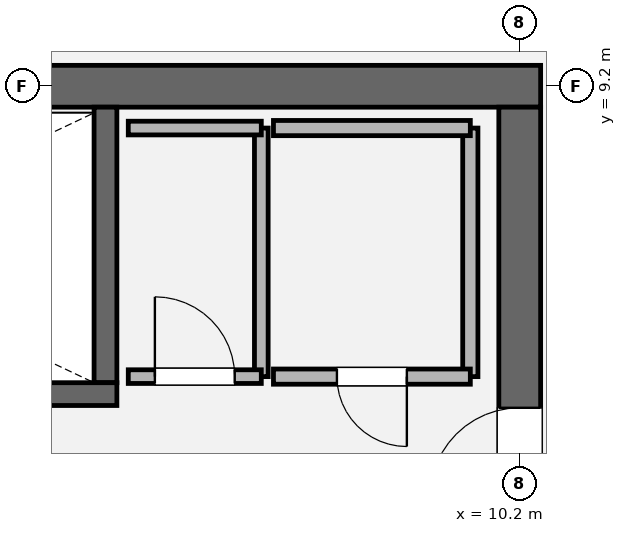
"""IFC4 building model, lengths in metres.
Left out: names, types, materials, properties, quantities, classifications, styles, units other than length and angle.
Written with IfcOpenShell. Run it as: python <this file> out.ifc"""

import sys

from ifc_helpers import new_model, si_unit, direction, frame, frame_2d, origin, place, context, subcontext, project, spatial, rectangle, extrude, element, fill, save


model = new_model("IFC4")
c1 = context("Model", 3, precision=1e-05, world=origin(), true_north=direction((0.0, 1.0)))
c2 = subcontext(c1, "Body", "Model", "MODEL_VIEW")
j1 = project(units=[si_unit("LENGTHUNIT", "METRE"), si_unit("PLANEANGLEUNIT", "RADIAN")], contexts=[c1])
p1 = place(None, origin())
s1 = spatial("IfcSite", under=j1, at=p1, CompositionType="ELEMENT")
p2 = place(p1, origin())
s2 = spatial("IfcBuilding", under=s1, at=p2, CompositionType="ELEMENT")
p3 = place(p2, frame((0.0, 0.0, 283.8)))
s3 = spatial("IfcBuildingStorey", under=s2, at=p3, CompositionType="ELEMENT", Elevation=283.8)
p4 = place(p3, frame((-10.475, 9.2, 0.0), z_axis=(0.0, 0.0, 1.0), x_axis=(1.0, 0.0, 0.0)))
e1 = element("IfcWall", 1, at=p4, inside=s3, PredefinedType="SHEAR", context=c2, shape_type="SweptSolid", body=[
    extrude(rectangle(XDim=20.95, YDim=0.55, at=frame_2d((10.475, 0.0))), origin(), (0.0, 0.0, 1.0), 4.2),
])
p5 = place(p3, frame((10.2, 8.925, 0.0), z_axis=(0.0, 0.0, 1.0), x_axis=(0.0, -1.0, 0.0)))
e2 = element("IfcWall", 2, at=p5, inside=s3, PredefinedType="SHEAR", context=c2, shape_type="SweptSolid", body=[
    extrude(rectangle(XDim=17.85, YDim=0.55, at=frame_2d((8.925, 0.0))), origin(), (0.0, 0.0, 1.0), 4.2),
])
p6 = place(p5, frame((3.955, 0.0, 0.0)))
e3 = element("IfcOpeningElement", 3, at=p6, cuts=e2, PredefinedType="OPENING", context=c2, shape_type="SweptSolid", body=[
    extrude(rectangle(XDim=1.18, YDim=2.2, at=frame_2d((0.59, 1.1))), frame((0.0, 0.285, 0.0), z_axis=(0.0, -1.0, 0.0), x_axis=(1.0, 0.0, 0.0)), (0.0, 0.0, 1.0), 0.57),
])
p7 = place(p3, frame((4.75, 8.925, 0.0), z_axis=(0.0, 0.0, 1.0), x_axis=(0.0, -1.0, 0.0)))
e4 = element("IfcWall", 4, at=p7, inside=s3, PredefinedType="SOLIDWALL", context=c2, shape_type="SweptSolid", body=[
    extrude(rectangle(XDim=3.625, YDim=0.3, at=frame_2d((1.812, 0.0))), origin(), (0.0, 0.0, 1.0), 4.2),
])
p8 = place(p3, frame((-4.9, 5.15, 0.0), z_axis=(0.0, 0.0, 1.0), x_axis=(1.0, 0.0, 0.0)))
e5 = element("IfcWall", 5, at=p8, inside=s3, PredefinedType="SOLIDWALL", context=c2, shape_type="SweptSolid", body=[
    extrude(rectangle(XDim=9.8, YDim=0.3, at=frame_2d((4.9, 0.0))), origin(), (0.0, 0.0, 1.0), 4.2),
])
p9 = place(p8, frame((0.56, 0.0, 0.0)))
e6 = element("IfcOpeningElement", 6, at=p9, cuts=e5, PredefinedType="OPENING", context=c2, shape_type="SweptSolid", body=[
    extrude(rectangle(XDim=1.18, YDim=2.2, at=frame_2d((0.59, 1.1))), frame((0.0, 0.16, 0.0), z_axis=(0.0, -1.0, 0.0), x_axis=(1.0, 0.0, 0.0)), (0.0, 0.0, 1.0), 0.32),
])
p10 = place(p3, frame((6.8, 5.38, 0.0), z_axis=(0.0, 0.0, 1.0), x_axis=(0.0, 1.0, 0.0)))
e7 = element("IfcWall", 7, at=p10, inside=s3, PredefinedType="PARTITIONING", context=c2, shape_type="SweptSolid", body=[
    extrude(rectangle(XDim=3.27, YDim=0.18, at=frame_2d((1.635, 0.0))), origin(), (0.0, 0.0, 1.0), 4.0),
])
p11 = place(p3, frame((6.8, 8.65, 0.0), z_axis=(0.0, 0.0, 1.0), x_axis=(-1.0, 0.0, 0.0)))
e8 = element("IfcWall", 8, at=p11, inside=s3, PredefinedType="PARTITIONING", context=c2, shape_type="SweptSolid", body=[
    extrude(rectangle(XDim=1.75, YDim=0.18, at=frame_2d((0.875, 0.0))), origin(), (0.0, 0.0, 1.0), 4.0),
])
p12 = place(p3, frame((5.05, 5.38, 0.0), z_axis=(0.0, 0.0, 1.0), x_axis=(1.0, 0.0, 0.0)))
e9 = element("IfcWall", 9, at=p12, inside=s3, PredefinedType="PARTITIONING", context=c2, shape_type="SweptSolid", body=[
    extrude(rectangle(XDim=1.75, YDim=0.18, at=frame_2d((0.875, 0.0))), origin(), (0.0, 0.0, 1.0), 4.0),
])
p13 = place(p12, frame((0.35, 0.0, 0.0)))
e10 = element("IfcOpeningElement", 10, at=p13, cuts=e9, PredefinedType="OPENING", context=c2, shape_type="SweptSolid", body=[
    extrude(rectangle(XDim=1.05, YDim=2.2, at=frame_2d((0.525, 1.1))), frame((0.0, 0.1, 0.0), z_axis=(0.0, -1.0, 0.0), x_axis=(1.0, 0.0, 0.0)), (0.0, 0.0, 1.0), 0.2),
])
p14 = place(p3, frame((9.55, 5.38, 0.0), z_axis=(0.0, 0.0, 1.0), x_axis=(0.0, 1.0, 0.0)))
e11 = element("IfcWall", 11, at=p14, inside=s3, PredefinedType="SOLIDWALL", context=c2, shape_type="SweptSolid", body=[
    extrude(rectangle(XDim=3.27, YDim=0.2, at=frame_2d((1.635, 0.0))), origin(), (0.0, 0.0, 1.0), 4.0),
])
p15 = place(p3, frame((9.55, 8.65, 0.0), z_axis=(0.0, 0.0, 1.0), x_axis=(-1.0, 0.0, 0.0)))
e12 = element("IfcWall", 12, at=p15, inside=s3, PredefinedType="SOLIDWALL", context=c2, shape_type="SweptSolid", body=[
    extrude(rectangle(XDim=2.59, YDim=0.2, at=frame_2d((1.295, 0.0))), origin(), (0.0, 0.0, 1.0), 4.0),
])
p16 = place(p3, frame((6.96, 5.38, 0.0), z_axis=(0.0, 0.0, 1.0), x_axis=(1.0, 0.0, 0.0)))
e13 = element("IfcWall", 13, at=p16, inside=s3, PredefinedType="SOLIDWALL", context=c2, shape_type="SweptSolid", body=[
    extrude(rectangle(XDim=2.59, YDim=0.2, at=frame_2d((1.295, 0.0))), origin(), (0.0, 0.0, 1.0), 4.0),
])
p17 = place(p16, frame((0.835, 0.0, 0.0)))
e14 = element("IfcOpeningElement", 14, at=p17, cuts=e13, PredefinedType="OPENING", context=c2, shape_type="SweptSolid", body=[
    extrude(rectangle(XDim=0.92, YDim=2.1, at=frame_2d((0.46, 1.05))), frame((0.0, 0.11, 0.0), z_axis=(0.0, -1.0, 0.0), x_axis=(1.0, 0.0, 0.0)), (0.0, 0.0, 1.0), 0.22),
])
p18 = place(p6, origin())
e15 = element("IfcDoor", 15, at=p18, inside=s3, OperationType="SINGLE_SWING_RIGHT", PredefinedType="DOOR", context=c2, shape_type="SweptSolid", body=[
    extrude(rectangle(XDim=1.18, YDim=2.2, at=frame_2d((0.59, 1.1))), frame((0.0, 0.025, 0.0), z_axis=(0.0, -1.0, 0.0), x_axis=(1.0, 0.0, 0.0)), (0.0, 0.0, 1.0), 0.05),
])
fill(e3, e15)
p19 = place(p13, origin())
e16 = element("IfcDoor", 16, at=p19, inside=s3, OperationType="SINGLE_SWING_LEFT", PredefinedType="DOOR", context=c2, shape_type="SweptSolid", body=[
    extrude(rectangle(XDim=1.05, YDim=2.2, at=frame_2d((0.525, 1.1))), frame((0.0, 0.025, 0.0), z_axis=(0.0, -1.0, 0.0), x_axis=(1.0, 0.0, 0.0)), (0.0, 0.0, 1.0), 0.05),
])
fill(e10, e16)
p20 = place(p17, origin())
e17 = element("IfcDoor", 17, at=p20, inside=s3, OperationType="SINGLE_SWING_RIGHT", PredefinedType="DOOR", context=c2, shape_type="SweptSolid", body=[
    extrude(rectangle(XDim=0.92, YDim=2.1, at=frame_2d((0.46, 1.05))), frame((0.0, 0.025, 0.0), z_axis=(0.0, -1.0, 0.0), x_axis=(1.0, 0.0, 0.0)), (0.0, 0.0, 1.0), 0.05),
])
fill(e14, e17)
save(model, sys.argv[1])
